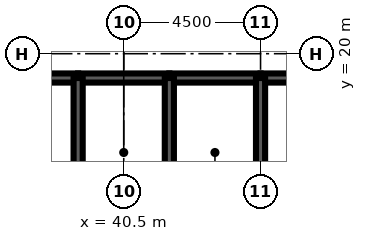
"""IFC4 building model, lengths in metres.
Left out: names, types, materials, properties, quantities, classifications, styles, units other than length and angle.
Written with IfcOpenShell. Run it as: python <this file> out.ifc"""

import sys

from ifc_helpers import new_model, si_unit, direction, frame, frame_2d, origin, place, context, subcontext, project, spatial, rectangle, extrude, element, fill, save


model = new_model("IFC4")
c1 = context("Model", 3, precision=1e-05, world=origin(), true_north=direction((0.0, 1.0)))
c2 = subcontext(c1, "Body", "Model", "MODEL_VIEW")
j1 = project(units=[si_unit("LENGTHUNIT", "METRE"), si_unit("PLANEANGLEUNIT", "RADIAN")], contexts=[c1])
p1 = place(None, origin())
s1 = spatial("IfcSite", under=j1, at=p1, CompositionType="ELEMENT")
p2 = place(p1, origin())
s2 = spatial("IfcBuilding", under=s1, at=p2, CompositionType="ELEMENT")
p3 = place(p2, frame((0.0, 0.0, 313.1)))
s3 = spatial("IfcBuildingStorey", under=s2, at=p3, CompositionType="ELEMENT", Elevation=313.1)
p4 = place(p3, frame((36.0, 19.2, 0.0), z_axis=(0.0, 0.0, 1.0), x_axis=(1.0, 0.0, 0.0)))
e1 = element("IfcWall", 1, at=p4, inside=s3, PredefinedType="SOLIDWALL", context=c2, shape_type="SweptSolid", body=[
    extrude(rectangle(XDim=3.0, YDim=0.3, at=frame_2d((1.5, 0.0))), origin(), (0.0, 0.0, 1.0), 4.2),
])
p5 = place(p4, frame((0.95, 0.0, 0.0)))
e2 = element("IfcOpeningElement", 2, at=p5, cuts=e1, PredefinedType="OPENING", context=c2, shape_type="SweptSolid", body=[
    extrude(rectangle(XDim=1.1, YDim=2.2, at=frame_2d((0.55, 1.1))), frame((0.0, 0.16, 0.0), z_axis=(0.0, -1.0, 0.0), x_axis=(1.0, 0.0, 0.0)), (0.0, 0.0, 1.0), 0.32),
])
p6 = place(p3, frame((39.0, 19.2, 0.0), z_axis=(0.0, 0.0, 1.0), x_axis=(1.0, 0.0, 0.0)))
e3 = element("IfcWall", 3, at=p6, inside=s3, PredefinedType="SOLIDWALL", context=c2, shape_type="SweptSolid", body=[
    extrude(rectangle(XDim=3.0, YDim=0.3, at=frame_2d((1.5, 0.0))), origin(), (0.0, 0.0, 1.0), 4.2),
])
p7 = place(p6, frame((1.0, 0.0, 0.0)))
e4 = element("IfcOpeningElement", 4, at=p7, cuts=e3, PredefinedType="OPENING", context=c2, shape_type="SweptSolid", body=[
    extrude(rectangle(XDim=1.0, YDim=2.1, at=frame_2d((0.5, 1.05))), frame((0.0, 0.16, 0.0), z_axis=(0.0, -1.0, 0.0), x_axis=(1.0, 0.0, 0.0)), (0.0, 0.0, 1.0), 0.32),
])
p8 = place(p3, frame((42.0, 19.2, 0.0), z_axis=(0.0, 0.0, 1.0), x_axis=(1.0, 0.0, 0.0)))
e5 = element("IfcWall", 5, at=p8, inside=s3, PredefinedType="SOLIDWALL", context=c2, shape_type="SweptSolid", body=[
    extrude(rectangle(XDim=3.0, YDim=0.3, at=frame_2d((1.5, 0.0))), origin(), (0.0, 0.0, 1.0), 4.2),
])
p9 = place(p8, frame((1.0, 0.0, 0.0)))
e6 = element("IfcOpeningElement", 6, at=p9, cuts=e5, PredefinedType="OPENING", context=c2, shape_type="SweptSolid", body=[
    extrude(rectangle(XDim=1.0, YDim=2.1, at=frame_2d((0.5, 1.05))), frame((0.0, 0.16, 0.0), z_axis=(0.0, -1.0, 0.0), x_axis=(1.0, 0.0, 0.0)), (0.0, 0.0, 1.0), 0.32),
])
p10 = place(p3, frame((45.0, 19.2, 0.0), z_axis=(0.0, 0.0, 1.0), x_axis=(1.0, 0.0, 0.0)))
e7 = element("IfcWall", 7, at=p10, inside=s3, PredefinedType="SOLIDWALL", context=c2, shape_type="SweptSolid", body=[
    extrude(rectangle(XDim=9.0, YDim=0.3, at=frame_2d((4.5, 0.0))), origin(), (0.0, 0.0, 1.0), 4.2),
])
p11 = place(p10, frame((7.35, 0.0, 0.0)))
e8 = element("IfcOpeningElement", 8, at=p11, cuts=e7, PredefinedType="OPENING", context=c2, shape_type="SweptSolid", body=[
    extrude(rectangle(XDim=1.0, YDim=2.1, at=frame_2d((0.5, 1.05))), frame((0.0, 0.16, 0.0), z_axis=(0.0, -1.0, 0.0), x_axis=(1.0, 0.0, 0.0)), (0.0, 0.0, 1.0), 0.32),
])
for number, where, z_axis, x_axis in (
    (9, (39.0, 16.0, 0.0), (0.0, 0.0, 1.0), (0.0, 1.0, 0.0)),
    (10, (42.0, 16.0, 0.0), (0.0, 0.0, 1.0), (0.0, 1.0, 0.0)),
    (11, (45.0, 16.0, 0.0), (0.0, 0.0, 1.0), (0.0, 1.0, 0.0)),
):
    element("IfcWall", number, at=place(p3, frame(where, z_axis=z_axis, x_axis=x_axis)), inside=s3, PredefinedType="SOLIDWALL", context=c2, shape_type="SweptSolid", body=[
        extrude(rectangle(XDim=3.2, YDim=0.3, at=frame_2d((1.6, 0.0))), origin(), (0.0, 0.0, 1.0), 4.2),
    ])
p12 = place(p3, frame((39.15, 17.3, 0.0), z_axis=(0.0, 0.0, 1.0), x_axis=(1.0, 0.0, 0.0)))
e12 = element("IfcWall", 12, at=p12, inside=s3, PredefinedType="SOLIDWALL", context=c2, shape_type="SweptSolid", body=[
    extrude(rectangle(XDim=2.7, YDim=0.3, at=frame_2d((1.35, 0.0))), origin(), (0.0, 0.0, 1.0), 4.04),
])
p13 = place(p12, frame((0.85, 0.0, 0.0)))
e13 = element("IfcOpeningElement", 13, at=p13, cuts=e12, PredefinedType="OPENING", context=c2, shape_type="SweptSolid", body=[
    extrude(rectangle(XDim=1.0, YDim=2.1, at=frame_2d((0.5, 1.05))), frame((0.0, 0.16, 0.0), z_axis=(0.0, -1.0, 0.0), x_axis=(1.0, 0.0, 0.0)), (0.0, 0.0, 1.0), 0.32),
])
p14 = place(p3, frame((42.15, 17.3, 0.0), z_axis=(0.0, 0.0, 1.0), x_axis=(1.0, 0.0, 0.0)))
e14 = element("IfcWall", 14, at=p14, inside=s3, PredefinedType="SOLIDWALL", context=c2, shape_type="SweptSolid", body=[
    extrude(rectangle(XDim=2.7, YDim=0.3, at=frame_2d((1.35, 0.0))), origin(), (0.0, 0.0, 1.0), 4.04),
])
p15 = place(p14, frame((0.85, 0.0, 0.0)))
e15 = element("IfcOpeningElement", 15, at=p15, cuts=e14, PredefinedType="OPENING", context=c2, shape_type="SweptSolid", body=[
    extrude(rectangle(XDim=1.0, YDim=2.1, at=frame_2d((0.5, 1.05))), frame((0.0, 0.16, 0.0), z_axis=(0.0, -1.0, 0.0), x_axis=(1.0, 0.0, 0.0)), (0.0, 0.0, 1.0), 0.32),
])
p16 = place(p13, origin())
e16 = element("IfcDoor", 16, at=p16, inside=s3, OperationType="SINGLE_SWING_LEFT", PredefinedType="DOOR", context=c2, shape_type="SweptSolid", body=[
    extrude(rectangle(XDim=1.0, YDim=2.1, at=frame_2d((0.5, 1.05))), frame((0.0, 0.025, 0.0), z_axis=(0.0, -1.0, 0.0), x_axis=(1.0, 0.0, 0.0)), (0.0, 0.0, 1.0), 0.05),
])
fill(e13, e16)
p17 = place(p15, origin())
e17 = element("IfcDoor", 17, at=p17, inside=s3, OperationType="SINGLE_SWING_LEFT", PredefinedType="DOOR", context=c2, shape_type="SweptSolid", body=[
    extrude(rectangle(XDim=1.0, YDim=2.1, at=frame_2d((0.5, 1.05))), frame((0.0, 0.025, 0.0), z_axis=(0.0, -1.0, 0.0), x_axis=(1.0, 0.0, 0.0)), (0.0, 0.0, 1.0), 0.05),
])
fill(e15, e17)
p18 = place(p7, origin())
e18 = element("IfcDoor", 18, at=p18, inside=s3, OperationType="SINGLE_SWING_LEFT", PredefinedType="DOOR", context=c2, shape_type="SweptSolid", body=[
    extrude(rectangle(XDim=1.0, YDim=2.1, at=frame_2d((0.5, 1.05))), frame((0.0, 0.025, 0.0), z_axis=(0.0, -1.0, 0.0), x_axis=(1.0, 0.0, 0.0)), (0.0, 0.0, 1.0), 0.05),
])
fill(e4, e18)
p19 = place(p9, origin())
e19 = element("IfcDoor", 19, at=p19, inside=s3, OperationType="SINGLE_SWING_LEFT", PredefinedType="DOOR", context=c2, shape_type="SweptSolid", body=[
    extrude(rectangle(XDim=1.0, YDim=2.1, at=frame_2d((0.5, 1.05))), frame((0.0, 0.025, 0.0), z_axis=(0.0, -1.0, 0.0), x_axis=(1.0, 0.0, 0.0)), (0.0, 0.0, 1.0), 0.05),
])
fill(e6, e19)
save(model, sys.argv[1])
